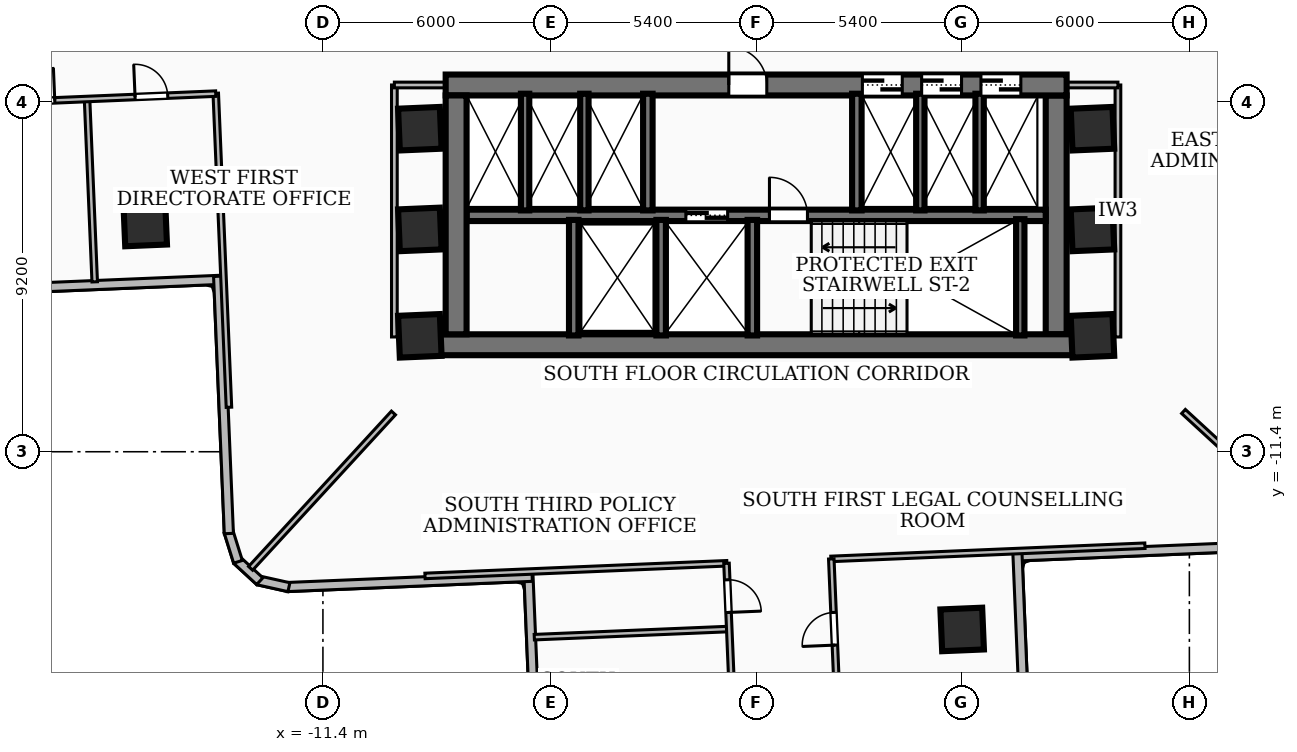
"""IFC4 building model, lengths in metres.
Left out: names, types, materials, properties, quantities, classifications, styles, units other than length and angle.
Written with IfcOpenShell. Run it as: python <this file> out.ifc"""

import sys

from ifc_helpers import new_model, si_unit, direction, frame, frame_2d, origin, origin_2d, place, context, subcontext, project, spatial, rectangle, extrude, element, fill, save


model = new_model("IFC4")
c1 = context("Model", 3, precision=1e-05, world=origin(), true_north=direction((0.0, 1.0)))
c2 = subcontext(c1, "Body", "Model", "MODEL_VIEW")
j1 = project(units=[si_unit("LENGTHUNIT", "METRE"), si_unit("PLANEANGLEUNIT", "RADIAN")], contexts=[c1])
p1 = place(None, origin())
s1 = spatial("IfcSite", under=j1, at=p1, CompositionType="ELEMENT")
p2 = place(p1, origin())
s2 = spatial("IfcBuilding", under=s1, at=p2, CompositionType="ELEMENT")
p3 = place(p2, frame((0.0, 0.0, 46.08)))
s3 = spatial("IfcBuildingStorey", under=s2, at=p3, CompositionType="ELEMENT", Elevation=46.08)
p4 = place(p3, frame((8.78, -8.585, 0.0), z_axis=(0.0, 0.0, 1.0), x_axis=(-1.0, 0.0, 0.0)))
e1 = element("IfcWall", 1, at=p4, inside=s3, PredefinedType="SHEAR", context=c2, shape_type="SweptSolid", body=[
    extrude(rectangle(XDim=17.56, YDim=0.55, at=frame_2d((8.78, 0.0))), origin(), (0.0, 0.0, 1.0), 3.32),
])
p5 = place(p3, frame((-8.17, -1.75, 0.0), z_axis=(0.0, 0.0, 1.0), x_axis=(1.0, 0.0, 0.0)))
e2 = element("IfcWall", 2, at=p5, inside=s3, PredefinedType="SHEAR", context=c2, shape_type="SweptSolid", body=[
    extrude(rectangle(XDim=16.34, YDim=0.55, at=frame_2d((8.17, 0.0))), origin(), (0.0, 0.0, 1.0), 3.32),
])
p6 = place(p5, frame((7.45, 0.0, 0.0)))
e3 = element("IfcOpeningElement", 3, at=p6, cuts=e2, PredefinedType="OPENING", context=c2, shape_type="SweptSolid", body=[
    extrude(rectangle(XDim=1.0, YDim=2.1, at=frame_2d((0.5, 1.05))), frame((0.0, 0.285, 0.0), z_axis=(0.0, -1.0, 0.0), x_axis=(1.0, 0.0, 0.0)), (0.0, 0.0, 1.0), 0.57),
])
p7 = place(p5, frame((10.965, 0.0, 0.0)))
e4 = element("IfcOpeningElement", 4, at=p7, cuts=e2, PredefinedType="OPENING", context=c2, shape_type="SweptSolid", body=[
    extrude(rectangle(XDim=1.05, YDim=2.15, at=frame_2d((0.525, 1.075))), frame((0.0, 0.285, 0.0), z_axis=(0.0, -1.0, 0.0), x_axis=(1.0, 0.0, 0.0)), (0.0, 0.0, 1.0), 0.57),
])
p8 = place(p5, frame((12.525, 0.0, 0.0)))
e5 = element("IfcOpeningElement", 5, at=p8, cuts=e2, PredefinedType="OPENING", context=c2, shape_type="SweptSolid", body=[
    extrude(rectangle(XDim=1.05, YDim=2.15, at=frame_2d((0.525, 1.075))), frame((0.0, 0.285, 0.0), z_axis=(0.0, -1.0, 0.0), x_axis=(1.0, 0.0, 0.0)), (0.0, 0.0, 1.0), 0.57),
])
p9 = place(p5, frame((14.085, 0.0, 0.0)))
e6 = element("IfcOpeningElement", 6, at=p9, cuts=e2, PredefinedType="OPENING", context=c2, shape_type="SweptSolid", body=[
    extrude(rectangle(XDim=1.05, YDim=2.15, at=frame_2d((0.525, 1.075))), frame((0.0, 0.285, 0.0), z_axis=(0.0, -1.0, 0.0), x_axis=(1.0, 0.0, 0.0)), (0.0, 0.0, 1.0), 0.57),
])
for number, where, z_axis, x_axis in (
    (7, (-7.895, -8.31, 0.0), (0.0, 0.0, 1.0), (0.0, 1.0, 0.0)),
    (8, (7.895, -2.025, 0.0), (0.0, 0.0, 1.0), (0.0, -1.0, 0.0)),
):
    element("IfcWall", number, at=place(p3, frame(where, z_axis=z_axis, x_axis=x_axis)), inside=s3, PredefinedType="SHEAR", context=c2, shape_type="SweptSolid", body=[
        extrude(rectangle(XDim=6.285, YDim=0.55, at=frame_2d((3.143, 0.0))), origin(), (0.0, 0.0, 1.0), 3.32),
    ])
p10 = place(p3, frame((-7.62, -5.18, 0.0), z_axis=(0.0, 0.0, 1.0), x_axis=(1.0, 0.0, 0.0)))
e9 = element("IfcWall", 9, at=p10, inside=s3, PredefinedType="SOLIDWALL", context=c2, shape_type="SweptSolid", body=[
    extrude(rectangle(XDim=15.24, YDim=0.3, at=frame_2d((7.62, 0.0))), origin(), (0.0, 0.0, 1.0), 3.32),
])
p11 = place(p10, frame((5.77, 0.0, 0.0)))
e10 = element("IfcOpeningElement", 10, at=p11, cuts=e9, PredefinedType="OPENING", context=c2, shape_type="SweptSolid", body=[
    extrude(rectangle(XDim=1.1, YDim=2.15, at=frame_2d((0.55, 1.075))), frame((0.0, 0.16, 0.0), z_axis=(0.0, -1.0, 0.0), x_axis=(1.0, 0.0, 0.0)), (0.0, 0.0, 1.0), 0.32),
])
p12 = place(p10, frame((7.97, 0.0, 0.0)))
e11 = element("IfcOpeningElement", 11, at=p12, cuts=e9, PredefinedType="OPENING", context=c2, shape_type="SweptSolid", body=[
    extrude(rectangle(XDim=1.0, YDim=2.1, at=frame_2d((0.5, 1.05))), frame((0.0, 0.16, 0.0), z_axis=(0.0, -1.0, 0.0), x_axis=(1.0, 0.0, 0.0)), (0.0, 0.0, 1.0), 0.32),
])
p13 = place(p3, frame((6.95, -8.34, 0.0), z_axis=(0.0, 0.0, 1.0), x_axis=(0.0, 1.0, 0.0)))
e12 = element("IfcWall", 12, at=p13, inside=s3, PredefinedType="SOLIDWALL", context=c2, shape_type="SweptSolid", body=[
    extrude(rectangle(XDim=3.06, YDim=0.22, at=frame_2d((1.53, 0.0))), origin(), (0.0, 0.0, 1.0), 3.32),
])
for number, where, z_axis, x_axis in (
    (13, (-0.1, -8.34, 0.0), (0.0, 0.0, 1.0), (0.0, 1.0, 0.0)),
    (14, (-2.5, -8.34, 0.0), (0.0, 0.0, 1.0), (0.0, 1.0, 0.0)),
    (15, (-4.8, -8.34, 0.0), (0.0, 0.0, 1.0), (0.0, 1.0, 0.0)),
):
    element("IfcWall", number, at=place(p3, frame(where, z_axis=z_axis, x_axis=x_axis)), inside=s3, PredefinedType="SOLIDWALL", context=c2, shape_type="SweptSolid", body=[
        extrude(rectangle(XDim=3.04, YDim=0.25, at=frame_2d((1.52, 0.0))), origin(), (0.0, 0.0, 1.0), 3.32),
    ])
for number, where, z_axis, x_axis in (
    (16, (-2.85, -5.05, 0.0), (0.0, 0.0, 1.0), (0.0, 1.0, 0.0)),
    (17, (2.65, -5.05, 0.0), (0.0, 0.0, 1.0), (0.0, 1.0, 0.0)),
):
    element("IfcWall", number, at=place(p3, frame(where, z_axis=z_axis, x_axis=x_axis)), inside=s3, PredefinedType="SOLIDWALL", context=c2, shape_type="SweptSolid", body=[
        extrude(rectangle(XDim=3.07, YDim=0.25, at=frame_2d((1.535, 0.0))), origin(), (0.0, 0.0, 1.0), 3.32),
    ])
for number, where, z_axis, x_axis in (
    (18, (4.32, -5.05, 0.0), (0.0, 0.0, 1.0), (0.0, 1.0, 0.0)),
    (19, (5.88, -5.05, 0.0), (0.0, 0.0, 1.0), (0.0, 1.0, 0.0)),
    (20, (-6.08, -5.05, 0.0), (0.0, 0.0, 1.0), (0.0, 1.0, 0.0)),
    (21, (-4.52, -5.05, 0.0), (0.0, 0.0, 1.0), (0.0, 1.0, 0.0)),
):
    element("IfcWall", number, at=place(p3, frame(where, z_axis=z_axis, x_axis=x_axis)), inside=s3, PredefinedType="SOLIDWALL", context=c2, shape_type="SweptSolid", body=[
        extrude(rectangle(XDim=3.07, YDim=0.22, at=frame_2d((1.535, 0.0))), origin(), (0.0, 0.0, 1.0), 3.32),
    ])
for number, where, z_axis, x_axis in (
    (22, (-8.85, -5.55, 0.0), (0.0, 0.0, 1.0), (0.999, 0.042, 0.0)),
    (23, (-8.85, -2.9, 0.0), (0.0, 0.0, 1.0), (0.999, 0.042, 0.0)),
    (24, (8.85, -5.55, 0.0), (0.0, 0.0, 1.0), (0.999, 0.042, 0.0)),
    (25, (8.85, -2.9, 0.0), (0.0, 0.0, 1.0), (0.999, 0.042, 0.0)),
    (26, (8.85, -8.35, 0.0), (0.0, 0.0, 1.0), (0.999, 0.042, 0.0)),
    (27, (-8.85, -8.35, 0.0), (0.0, 0.0, 1.0), (0.999, 0.042, 0.0)),
    (28, (-16.076, -5.421, 0.0), (0.0, 0.0, 1.0), (0.999, 0.042, 0.0)),
    (29, (5.421, -16.076, 0.0), (0.0, 0.0, 1.0), (0.999, 0.042, 0.0)),
):
    element("IfcColumn", number, at=place(p3, frame(where, z_axis=z_axis, x_axis=x_axis)), inside=s3, PredefinedType="COLUMN", context=c2, shape_type="SweptSolid", body=[
        extrude(rectangle(XDim=1.1, YDim=1.1, at=origin_2d()), origin(), (0.0, 0.0, 1.0), 3.6),
    ])
p14 = place(p3, frame((-14.058, -6.875, 0.0), z_axis=(0.0, 0.0, 1.0), x_axis=(-0.999124376175, -0.04183874918, 0.0)))
e30 = element("IfcWall", 30, at=p14, inside=s3, PredefinedType="SOLIDWALL", context=c2, shape_type="SweptSolid", body=[
    extrude(rectangle(XDim=16.876, YDim=0.24, at=frame_2d((8.438, 0.0))), origin(), (0.0, 0.0, 1.0), 2.624),
])
p15 = place(p3, frame((13.552, -13.875, 0.0), z_axis=(0.0, 0.0, 1.0), x_axis=(-0.999127443157, -0.041765444226, 0.0)))
e31 = element("IfcWall", 31, at=p15, inside=s3, PredefinedType="SOLIDWALL", context=c2, shape_type="SweptSolid", body=[
    extrude(rectangle(XDim=6.775, YDim=0.24, at=frame_2d((3.387, 0.0))), origin(), (0.0, 0.0, 1.0), 3.32),
])
p16 = place(p3, frame((6.875, -14.058, 0.0), z_axis=(0.0, 0.0, 1.0), x_axis=(0.041850586852, -0.999123880397, 0.0)))
e32 = element("IfcWall", 32, at=p16, inside=s3, PredefinedType="SOLIDWALL", context=c2, shape_type="SweptSolid", body=[
    extrude(rectangle(XDim=13.476, YDim=0.24, at=frame_2d((6.738, 0.0))), origin(), (0.0, 0.0, 1.0), 3.32),
])
p17 = place(p16, frame((10.276, 0.0, 0.85)))
e33 = element("IfcOpeningElement", 33, at=p17, cuts=e32, PredefinedType="OPENING", context=c2, shape_type="SweptSolid", body=[
    extrude(rectangle(XDim=2.1, YDim=1.6, at=frame_2d((1.05, 0.8))), frame((0.0, 0.13, 0.0), z_axis=(0.0, -1.0, 0.0), x_axis=(1.0, 0.0, 0.0)), (0.0, 0.0, 1.0), 0.26),
])
p18 = place(p3, frame((-5.43, -28.061, 0.0), z_axis=(0.0, 0.0, 1.0), x_axis=(-0.041852859621, 0.999123785195, 0.0)))
e34 = element("IfcWall", 34, at=p18, inside=s3, PredefinedType="SOLIDWALL", context=c2, shape_type="SweptSolid", body=[
    extrude(rectangle(XDim=13.475, YDim=0.24, at=frame_2d((6.737, 0.0))), origin(), (0.0, 0.0, 1.0), 2.401),
])
p19 = place(p3, frame((-5.894, -14.69, 0.0), z_axis=(0.0, 0.0, 1.0), x_axis=(-0.999124860845, -0.041827173477, 0.0)))
e35 = element("IfcWall", 35, at=p19, inside=s3, PredefinedType="SOLIDWALL", context=c2, shape_type="SweptSolid", body=[
    extrude(rectangle(XDim=6.456, YDim=0.24, at=frame_2d((3.228, 0.0))), origin(), (0.0, 0.0, 1.0), 2.401),
])
p20 = place(p3, frame((-12.295, -14.964, 0.0), z_axis=(0.0, 0.0, 1.0), x_axis=(-0.976089939158, 0.21736704137, 0.0)))
e36 = element("IfcWall", 36, at=p20, inside=s3, PredefinedType="SOLIDWALL", context=c2, shape_type="SweptSolid", body=[
    extrude(rectangle(XDim=0.829, YDim=0.24, at=frame_2d((0.415, 0.0))), origin(), (0.0, 0.0, 1.0), 3.32),
])
p21 = place(p3, frame((-13.062, -14.806, 0.0), z_axis=(0.0, 0.0, 1.0), x_axis=(-0.735344259965, 0.677693750404, 0.0)))
e37 = element("IfcWall", 37, at=p21, inside=s3, PredefinedType="SOLIDWALL", context=c2, shape_type="SweptSolid", body=[
    extrude(rectangle(XDim=0.813, YDim=0.24, at=frame_2d((0.406, 0.0))), origin(), (0.0, 0.0, 1.0), 3.32),
])
p22 = place(p3, frame((-13.635, -14.296, 0.0), z_axis=(0.0, 0.0, 1.0), x_axis=(-0.298542680168, 0.954396284631, 0.0)))
e38 = element("IfcWall", 38, at=p22, inside=s3, PredefinedType="SOLIDWALL", context=c2, shape_type="SweptSolid", body=[
    extrude(rectangle(XDim=0.831, YDim=0.24, at=frame_2d((0.416, 0.0))), origin(), (0.0, 0.0, 1.0), 3.32),
])
p23 = place(p3, frame((-13.875, -13.552, 0.0), z_axis=(0.0, 0.0, 1.0), x_axis=(-0.041765444226, 0.999127443157, 0.0)))
e39 = element("IfcWall", 39, at=p23, inside=s3, PredefinedType="SOLIDWALL", context=c2, shape_type="SweptSolid", body=[
    extrude(rectangle(XDim=6.775, YDim=0.24, at=frame_2d((3.387, 0.0))), origin(), (0.0, 0.0, 1.0), 2.624),
])
p24 = place(p3, frame((-9.52, -8.38, 0.0), z_axis=(0.0, 0.0, 1.0), x_axis=(0.0, 1.0, 0.0)))
e40 = element("IfcWall", 40, at=p24, inside=s3, PredefinedType="PARTITIONING", context=c2, shape_type="SweptSolid", body=[
    extrude(rectangle(XDim=6.63, YDim=0.15, at=frame_2d((3.315, 0.0))), origin(), (0.0, 0.0, 1.0), 2.401),
])
p25 = place(p3, frame((-7.85, -1.75, 0.0), z_axis=(0.0, 0.0, 1.0), x_axis=(-1.0, 0.0, 0.0)))
e41 = element("IfcWall", 41, at=p25, inside=s3, PredefinedType="PARTITIONING", context=c2, shape_type="SweptSolid", body=[
    extrude(rectangle(XDim=1.67, YDim=0.15, at=frame_2d((0.835, 0.0))), origin(), (0.0, 0.0, 1.0), 2.385),
])
p26 = place(p3, frame((9.52, -8.38, 0.0), z_axis=(0.0, 0.0, 1.0), x_axis=(0.0, 1.0, 0.0)))
e42 = element("IfcWall", 42, at=p26, inside=s3, PredefinedType="PARTITIONING", context=c2, shape_type="SweptSolid", body=[
    extrude(rectangle(XDim=6.63, YDim=0.15, at=frame_2d((3.315, 0.0))), origin(), (0.0, 0.0, 1.0), 2.401),
])
p27 = place(p3, frame((7.85, -1.75, 0.0), z_axis=(0.0, 0.0, 1.0), x_axis=(1.0, 0.0, 0.0)))
e43 = element("IfcWall", 43, at=p27, inside=s3, PredefinedType="PARTITIONING", context=c2, shape_type="SweptSolid", body=[
    extrude(rectangle(XDim=1.67, YDim=0.15, at=frame_2d((0.835, 0.0))), origin(), (0.0, 0.0, 1.0), 2.385),
])
p28 = place(p3, frame((-9.544, -10.38, 0.0), z_axis=(0.0, 0.0, 1.0), x_axis=(-0.676856513188, -0.736114977809, 0.0)))
e44 = element("IfcWall", 44, at=p28, inside=s3, PredefinedType="PARTITIONING", context=c2, shape_type="SweptSolid", body=[
    extrude(rectangle(XDim=5.554, YDim=0.145, at=frame_2d((2.777, 0.0))), origin(), (0.0, 0.0, 1.0), 2.624),
])
p29 = place(p3, frame((11.245, -10.34, 0.0), z_axis=(0.0, 0.0, 1.0), x_axis=(0.736178820698, -0.676787074312, 0.0)))
e45 = element("IfcWall", 45, at=p29, inside=s3, PredefinedType="PARTITIONING", context=c2, shape_type="SweptSolid", body=[
    extrude(rectangle(XDim=4.378, YDim=0.145, at=frame_2d((2.189, 0.0))), origin(), (0.0, 0.0, 1.0), 3.32),
])
p30 = place(p3, frame((-14.22, -1.967, 0.0), z_axis=(0.0, 0.0, 1.0), x_axis=(0.041948565382, -0.99911977153, 0.0)))
e46 = element("IfcWall", 46, at=p30, inside=s3, PredefinedType="PARTITIONING", context=c2, shape_type="SweptSolid", body=[
    extrude(rectangle(XDim=8.27, YDim=0.145, at=frame_2d((4.135, 0.0))), origin(), (0.0, 0.0, 1.0), 2.401),
])
p31 = place(p3, frame((-17.606, -2.139, 0.0), z_axis=(0.0, 0.0, 1.0), x_axis=(0.041901609945, -0.999121741873, 0.0)))
e47 = element("IfcWall", 47, at=p31, inside=s3, PredefinedType="PARTITIONING", context=c2, shape_type="SweptSolid", body=[
    extrude(rectangle(XDim=4.795, YDim=0.145, at=frame_2d((2.397, 0.0))), origin(), (0.0, 0.0, 1.0), 2.401),
])
p32 = place(p3, frame((-20.164, -2.226, 0.0), z_axis=(0.0, 0.0, 1.0), x_axis=(0.999123588206, 0.041857561916, 0.0)))
e48 = element("IfcWall", 48, at=p32, inside=s3, PredefinedType="PARTITIONING", context=c2, shape_type="SweptSolid", body=[
    extrude(rectangle(XDim=5.949, YDim=0.145, at=frame_2d((2.975, 0.0))), origin(), (0.0, 0.0, 1.0), 3.32),
])
p33 = place(p32, frame((3.824, 0.0, 0.0)))
e49 = element("IfcOpeningElement", 49, at=p33, cuts=e48, PredefinedType="OPENING", context=c2, shape_type="SweptSolid", body=[
    extrude(rectangle(XDim=0.86, YDim=2.04, at=frame_2d((0.43, 1.02))), frame((0.0, 0.083, 0.0), z_axis=(0.0, -1.0, 0.0), x_axis=(1.0, 0.0, 0.0)), (0.0, 0.0, 1.0), 0.165),
])
p34 = place(p32, frame((0.849, 0.0, 0.0)))
e50 = element("IfcOpeningElement", 50, at=p34, cuts=e48, PredefinedType="OPENING", context=c2, shape_type="SweptSolid", body=[
    extrude(rectangle(XDim=0.86, YDim=2.04, at=frame_2d((0.43, 1.02))), frame((0.0, 0.083, 0.0), z_axis=(0.0, -1.0, 0.0), x_axis=(1.0, 0.0, 0.0)), (0.0, 0.0, 1.0), 0.165),
])
p35 = place(p3, frame((1.967, -14.22, 0.0), z_axis=(0.0, 0.0, 1.0), x_axis=(0.99911977153, 0.041948565382, 0.0)))
e51 = element("IfcWall", 51, at=p35, inside=s3, PredefinedType="PARTITIONING", context=c2, shape_type="SweptSolid", body=[
    extrude(rectangle(XDim=8.27, YDim=0.145, at=frame_2d((4.135, 0.0))), origin(), (0.0, 0.0, 1.0), 2.401),
])
p36 = place(p3, frame((-8.714, -14.668, 0.0), z_axis=(0.0, 0.0, 1.0), x_axis=(0.999122557945, 0.041882146625, 0.0)))
e52 = element("IfcWall", 52, at=p36, inside=s3, PredefinedType="PARTITIONING", context=c2, shape_type="SweptSolid", body=[
    extrude(rectangle(XDim=7.951, YDim=0.145, at=frame_2d((3.976, 0.0))), origin(), (0.0, 0.0, 1.0), 2.401),
])
p37 = place(p3, frame((-5.838, -16.279, 0.0), z_axis=(0.0, 0.0, 1.0), x_axis=(0.999123283233, 0.041864840869, 0.0)))
e53 = element("IfcWall", 53, at=p37, inside=s3, PredefinedType="PARTITIONING", context=c2, shape_type="SweptSolid", body=[
    extrude(rectangle(XDim=5.114, YDim=0.145, at=frame_2d((2.557, 0.0))), origin(), (0.0, 0.0, 1.0), 2.401),
])
p38 = place(p3, frame((2.204, -19.625, 0.0), z_axis=(0.0, 0.0, 1.0), x_axis=(-0.041970303018, 0.999118858627, 0.0)))
e54 = element("IfcWall", 54, at=p38, inside=s3, PredefinedType="PARTITIONING", context=c2, shape_type="SweptSolid", body=[
    extrude(rectangle(XDim=5.41, YDim=0.145, at=frame_2d((2.705, 0.0))), origin(), (0.0, 0.0, 1.0), 3.32),
])
p39 = place(p38, frame((3.14, 0.0, 0.0)))
e55 = element("IfcOpeningElement", 55, at=p39, cuts=e54, PredefinedType="OPENING", context=c2, shape_type="SweptSolid", body=[
    extrude(rectangle(XDim=0.86, YDim=2.04, at=frame_2d((0.43, 1.02))), frame((0.0, 0.083, 0.0), z_axis=(0.0, -1.0, 0.0), x_axis=(1.0, 0.0, 0.0)), (0.0, 0.0, 1.0), 0.165),
])
p40 = place(p38, frame((0.435, 0.0, 0.0)))
e56 = element("IfcOpeningElement", 56, at=p40, cuts=e54, PredefinedType="OPENING", context=c2, shape_type="SweptSolid", body=[
    extrude(rectangle(XDim=0.86, YDim=2.04, at=frame_2d((0.43, 1.02))), frame((0.0, 0.083, 0.0), z_axis=(0.0, -1.0, 0.0), x_axis=(1.0, 0.0, 0.0)), (0.0, 0.0, 1.0), 0.165),
])
p41 = place(p3, frame((-0.78, -14.335, 0.0), z_axis=(0.0, 0.0, 1.0), x_axis=(0.041782565573, -0.999126727304, 0.0)))
e57 = element("IfcWall", 57, at=p41, inside=s3, PredefinedType="PARTITIONING", context=c2, shape_type="SweptSolid", body=[
    extrude(rectangle(XDim=5.411, YDim=0.145, at=frame_2d((2.705, 0.0))), origin(), (0.0, 0.0, 1.0), 3.32),
])
p42 = place(p41, frame((0.435, 0.0, 0.0)))
e58 = element("IfcOpeningElement", 58, at=p42, cuts=e57, PredefinedType="OPENING", context=c2, shape_type="SweptSolid", body=[
    extrude(rectangle(XDim=0.86, YDim=2.04, at=frame_2d((0.43, 1.02))), frame((0.0, 0.083, 0.0), z_axis=(0.0, -1.0, 0.0), x_axis=(1.0, 0.0, 0.0)), (0.0, 0.0, 1.0), 0.165),
])
p43 = place(p41, frame((3.14, 0.0, 0.0)))
e59 = element("IfcOpeningElement", 59, at=p43, cuts=e57, PredefinedType="OPENING", context=c2, shape_type="SweptSolid", body=[
    extrude(rectangle(XDim=0.86, YDim=2.04, at=frame_2d((0.43, 1.02))), frame((0.0, 0.083, 0.0), z_axis=(0.0, -1.0, 0.0), x_axis=(1.0, 0.0, 0.0)), (0.0, 0.0, 1.0), 0.165),
])
p44 = place(p6, origin())
e60 = element("IfcDoor", 60, at=p44, inside=s3, OperationType="SINGLE_SWING_LEFT", PredefinedType="DOOR", context=c2, shape_type="SweptSolid", body=[
    extrude(rectangle(XDim=1.0, YDim=2.1, at=frame_2d((0.5, 1.05))), frame((0.0, 0.025, 0.0), z_axis=(0.0, -1.0, 0.0), x_axis=(1.0, 0.0, 0.0)), (0.0, 0.0, 1.0), 0.05),
])
fill(e3, e60)
p45 = place(p11, origin())
e61 = element("IfcDoor", 61, at=p45, inside=s3, OperationType="DOUBLE_DOOR_SLIDING", PredefinedType="DOOR", context=c2, shape_type="SweptSolid", body=[
    extrude(rectangle(XDim=1.1, YDim=2.15, at=frame_2d((0.55, 1.075))), frame((0.0, 0.025, 0.0), z_axis=(0.0, -1.0, 0.0), x_axis=(1.0, 0.0, 0.0)), (0.0, 0.0, 1.0), 0.05),
])
fill(e10, e61)
p46 = place(p12, origin())
e62 = element("IfcDoor", 62, at=p46, inside=s3, OperationType="SINGLE_SWING_LEFT", PredefinedType="DOOR", context=c2, shape_type="SweptSolid", body=[
    extrude(rectangle(XDim=1.0, YDim=2.1, at=frame_2d((0.5, 1.05))), frame((0.0, 0.025, 0.0), z_axis=(0.0, -1.0, 0.0), x_axis=(1.0, 0.0, 0.0)), (0.0, 0.0, 1.0), 0.05),
])
fill(e11, e62)
p47 = place(p7, origin())
e63 = element("IfcDoor", 63, at=p47, inside=s3, OperationType="DOUBLE_DOOR_SLIDING", PredefinedType="DOOR", context=c2, shape_type="SweptSolid", body=[
    extrude(rectangle(XDim=1.05, YDim=2.15, at=frame_2d((0.525, 1.075))), frame((0.0, 0.025, 0.0), z_axis=(0.0, -1.0, 0.0), x_axis=(1.0, 0.0, 0.0)), (0.0, 0.0, 1.0), 0.05),
])
fill(e4, e63)
p48 = place(p8, origin())
e64 = element("IfcDoor", 64, at=p48, inside=s3, OperationType="DOUBLE_DOOR_SLIDING", PredefinedType="DOOR", context=c2, shape_type="SweptSolid", body=[
    extrude(rectangle(XDim=1.05, YDim=2.15, at=frame_2d((0.525, 1.075))), frame((0.0, 0.025, 0.0), z_axis=(0.0, -1.0, 0.0), x_axis=(1.0, 0.0, 0.0)), (0.0, 0.0, 1.0), 0.05),
])
fill(e5, e64)
p49 = place(p9, origin())
e65 = element("IfcDoor", 65, at=p49, inside=s3, OperationType="DOUBLE_DOOR_SLIDING", PredefinedType="DOOR", context=c2, shape_type="SweptSolid", body=[
    extrude(rectangle(XDim=1.05, YDim=2.15, at=frame_2d((0.525, 1.075))), frame((0.0, 0.025, 0.0), z_axis=(0.0, -1.0, 0.0), x_axis=(1.0, 0.0, 0.0)), (0.0, 0.0, 1.0), 0.05),
])
fill(e6, e65)
p50 = place(p33, origin())
e66 = element("IfcDoor", 66, at=p50, inside=s3, OperationType="SINGLE_SWING_LEFT", PredefinedType="DOOR", context=c2, shape_type="SweptSolid", body=[
    extrude(rectangle(XDim=0.86, YDim=2.04, at=frame_2d((0.43, 1.02))), frame((0.0, 0.025, 0.0), z_axis=(0.0, -1.0, 0.0), x_axis=(1.0, 0.0, 0.0)), (0.0, 0.0, 1.0), 0.05),
])
fill(e49, e66)
p51 = place(p34, origin())
e67 = element("IfcDoor", 67, at=p51, inside=s3, OperationType="SINGLE_SWING_RIGHT", PredefinedType="DOOR", context=c2, shape_type="SweptSolid", body=[
    extrude(rectangle(XDim=0.86, YDim=2.04, at=frame_2d((0.43, 1.02))), frame((0.0, 0.025, 0.0), z_axis=(0.0, -1.0, 0.0), x_axis=(1.0, 0.0, 0.0)), (0.0, 0.0, 1.0), 0.05),
])
fill(e50, e67)
p52 = place(p39, origin())
e68 = element("IfcDoor", 68, at=p52, inside=s3, OperationType="SINGLE_SWING_LEFT", PredefinedType="DOOR", context=c2, shape_type="SweptSolid", body=[
    extrude(rectangle(XDim=0.86, YDim=2.04, at=frame_2d((0.43, 1.02))), frame((0.0, 0.025, 0.0), z_axis=(0.0, -1.0, 0.0), x_axis=(1.0, 0.0, 0.0)), (0.0, 0.0, 1.0), 0.05),
])
fill(e55, e68)
p53 = place(p42, origin())
e69 = element("IfcDoor", 69, at=p53, inside=s3, OperationType="SINGLE_SWING_RIGHT", PredefinedType="DOOR", context=c2, shape_type="SweptSolid", body=[
    extrude(rectangle(XDim=0.86, YDim=2.04, at=frame_2d((0.43, 1.02))), frame((0.0, 0.025, 0.0), z_axis=(0.0, -1.0, 0.0), x_axis=(1.0, 0.0, 0.0)), (0.0, 0.0, 1.0), 0.05),
])
fill(e58, e69)
save(model, sys.argv[1])
